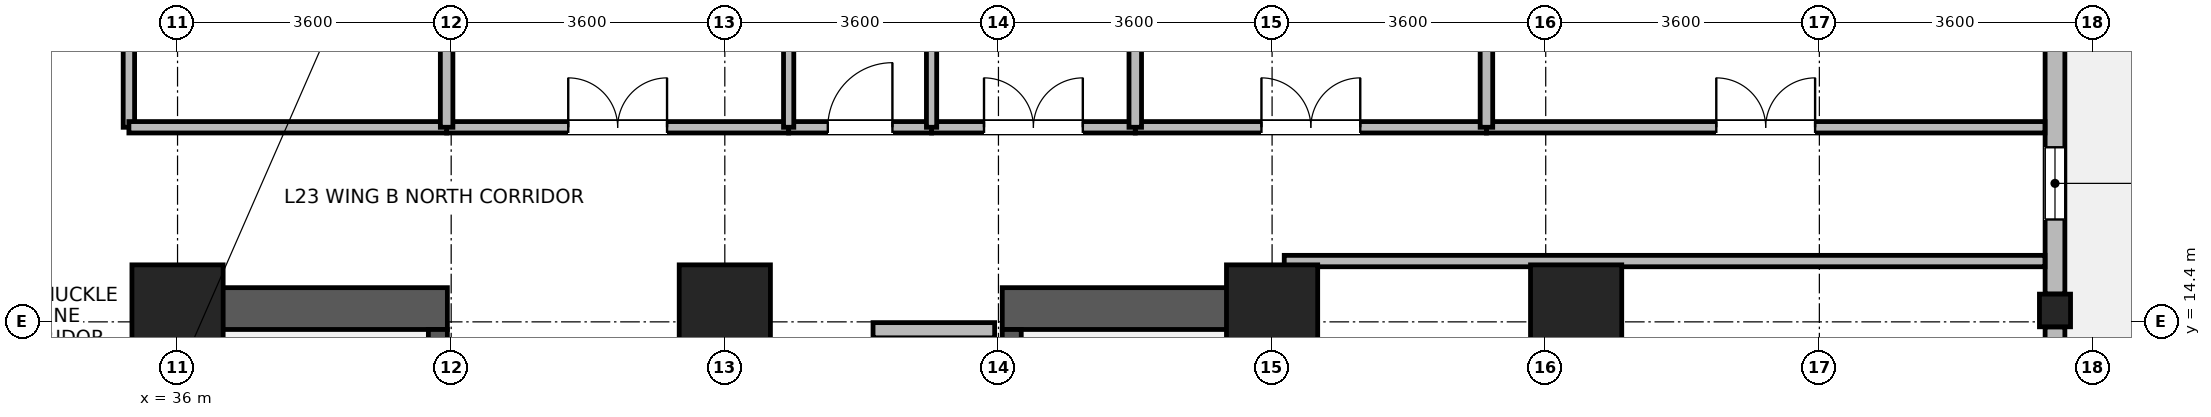
"""IFC4 building model, lengths in metres.
Left out: names, types, materials, properties, quantities, classifications, styles, units other than length and angle.
Written with IfcOpenShell. Run it as: python <this file> out.ifc"""

import sys

from ifc_helpers import new_model, si_unit, direction, frame, frame_2d, origin, origin_2d, place, context, subcontext, project, spatial, rectangle, i_section, extrude, source, transform, mapped, element, fill, save


model = new_model("IFC4")
c1 = context("Model", 3, precision=1e-05, world=origin(), true_north=direction((0.0, 1.0)))
c2 = subcontext(c1, "Body", "Model", "MODEL_VIEW")
j1 = project(units=[si_unit("LENGTHUNIT", "METRE"), si_unit("PLANEANGLEUNIT", "RADIAN")], contexts=[c1])
p1 = place(None, origin())
s1 = spatial("IfcSite", under=j1, at=p1, CompositionType="ELEMENT")
p2 = place(p1, origin())
s2 = spatial("IfcBuilding", under=s1, at=p2, CompositionType="ELEMENT")
p3 = place(p2, frame((0.0, 0.0, 93.4)))
s3 = spatial("IfcBuildingStorey", under=s2, at=p3, CompositionType="ELEMENT", Elevation=93.4)
for number, where, z_axis, x_axis in (
    (1, (36.075, 6.75, 0.0), (0.0, 0.0, 1.0), (0.0, 1.0, 0.0)),
    (2, (50.325, 6.75, 0.0), (0.0, 0.0, 1.0), (0.0, 1.0, 0.0)),
):
    element("IfcWall", number, at=place(p3, frame(where, z_axis=z_axis, x_axis=x_axis)), inside=s3, PredefinedType="SHEAR", context=c2, shape_type="SweptSolid", body=[
        extrude(rectangle(XDim=8.1, YDim=0.55, at=frame_2d((4.05, 0.0))), origin(), (0.0, 0.0, 1.0), 3.45),
    ])
for number, where, z_axis, x_axis in (
    (3, (36.35, 14.575, 0.0), (0.0, 0.0, 1.0), (1.0, 0.0, 0.0)),
    (4, (46.85, 14.575, 0.0), (0.0, 0.0, 1.0), (1.0, 0.0, 0.0)),
):
    element("IfcWall", number, at=place(p3, frame(where, z_axis=z_axis, x_axis=x_axis)), inside=s3, PredefinedType="SHEAR", context=c2, shape_type="SweptSolid", body=[
        extrude(rectangle(XDim=3.2, YDim=0.55, at=frame_2d((1.6, 0.0))), origin(), (0.0, 0.0, 1.0), 3.45),
    ])
p4 = place(p3, frame((39.425, 7.3, 0.0), z_axis=(0.0, 0.0, 1.0), x_axis=(0.0, 1.0, 0.0)))
e5 = element("IfcWall", 5, at=p4, inside=s3, PredefinedType="SHEAR", context=c2, shape_type="SweptSolid", body=[
    extrude(rectangle(XDim=7.0, YDim=0.25, at=frame_2d((3.5, 0.0))), origin(), (0.0, 0.0, 1.0), 3.45),
])
p5 = place(p4, frame((0.15, 0.0, 0.0)))
e6 = element("IfcOpeningElement", 6, at=p5, cuts=e5, PredefinedType="OPENING", context=c2, shape_type="SweptSolid", body=[
    extrude(rectangle(XDim=1.1, YDim=2.08, at=frame_2d((0.55, 1.04))), frame((0.0, 0.135, 0.0), z_axis=(0.0, -1.0, 0.0), x_axis=(1.0, 0.0, 0.0)), (0.0, 0.0, 1.0), 0.27),
])
p6 = place(p3, frame((46.975, 7.3, 0.0), z_axis=(0.0, 0.0, 1.0), x_axis=(0.0, 1.0, 0.0)))
e7 = element("IfcWall", 7, at=p6, inside=s3, PredefinedType="SHEAR", context=c2, shape_type="SweptSolid", body=[
    extrude(rectangle(XDim=7.0, YDim=0.25, at=frame_2d((3.5, 0.0))), origin(), (0.0, 0.0, 1.0), 3.45),
])
p7 = place(p6, frame((0.15, 0.0, 0.0)))
e8 = element("IfcOpeningElement", 8, at=p7, cuts=e7, PredefinedType="OPENING", context=c2, shape_type="SweptSolid", body=[
    extrude(rectangle(XDim=1.1, YDim=2.08, at=frame_2d((0.55, 1.04))), frame((0.0, 0.135, 0.0), z_axis=(0.0, -1.0, 0.0), x_axis=(1.0, 0.0, 0.0)), (0.0, 0.0, 1.0), 0.27),
])
m1 = source(origin(), c2, "Body", "SweptSolid", [
    extrude(rectangle(XDim=1.2, YDim=1.2, at=origin_2d()), origin(), (0.0, 0.0, 1.0), 3.7),
])
for number, where, z_axis, x_axis in (
    (9, (36.0, 14.55, 0.0), (0.0, 0.0, 1.0), (1.0, 0.0, 0.0)),
    (10, (43.2, 14.55, 0.0), (0.0, 0.0, 1.0), (1.0, 0.0, 0.0)),
    (11, (50.4, 14.55, 0.0), (0.0, 0.0, 1.0), (1.0, 0.0, 0.0)),
    (12, (54.4, 14.55, 0.0), (0.0, 0.0, 1.0), (1.0, 0.0, 0.0)),
):
    element("IfcColumn", number, at=place(p3, frame(where, z_axis=z_axis, x_axis=x_axis)), inside=s3, PredefinedType="COLUMN", context=c2, shape_type="MappedRepresentation", body=[
        mapped(m1, transform((0.0, 0.0, 0.0), x_axis=(1.0, 0.0, 0.0), y_axis=(0.0, 1.0, 0.0), z_axis=(0.0, 0.0, 1.0), scale=1.0)),
    ])
m2 = source(origin(), c2, "Body", "SweptSolid", [
    extrude(i_section(OverallWidth=0.409, OverallDepth=0.43, WebThickness=0.024, FlangeThickness=0.033, FilletRadius=0.015, at=origin_2d()), origin(), (0.0, 0.0, 1.0), 3.7),
])
p8 = place(p3, frame((60.7, 14.55, 0.0), z_axis=(0.0, 0.0, 1.0), x_axis=(1.0, 0.0, 0.0)))
e13 = element("IfcColumn", 13, at=p8, inside=s3, PredefinedType="COLUMN", context=c2, shape_type="MappedRepresentation", body=[
    mapped(m2, transform((0.0, 0.0, 0.0), x_axis=(1.0, 0.0, 0.0), y_axis=(0.0, 1.0, 0.0), z_axis=(0.0, 0.0, 1.0), scale=1.0)),
])
p9 = place(p3, frame((60.7, 14.334, 0.0), z_axis=(0.0, 0.0, 1.0), x_axis=(0.0, -1.0, 0.0)))
e14 = element("IfcWall", 14, at=p9, inside=s3, PredefinedType="STANDARD", context=c2, shape_type="SweptSolid", body=[
    extrude(rectangle(XDim=7.068, YDim=0.26, at=frame_2d((3.534, 0.0))), origin(), (0.0, 0.0, 1.0), 2.93),
])
p10 = place(p9, frame((0.867, 0.0, 0.85)))
e15 = element("IfcOpeningElement", 15, at=p10, cuts=e14, PredefinedType="OPENING", context=c2, shape_type="SweptSolid", body=[
    extrude(rectangle(XDim=1.8, YDim=1.85, at=frame_2d((0.9, 0.925))), frame((0.0, 0.14, 0.0), z_axis=(0.0, -1.0, 0.0), x_axis=(1.0, 0.0, 0.0)), (0.0, 0.0, 1.0), 0.28),
])
p11 = place(p9, frame((4.401, 0.0, 0.85)))
e16 = element("IfcOpeningElement", 16, at=p11, cuts=e14, PredefinedType="OPENING", context=c2, shape_type="SweptSolid", body=[
    extrude(rectangle(XDim=1.8, YDim=1.85, at=frame_2d((0.9, 0.925))), frame((0.0, 0.14, 0.0), z_axis=(0.0, -1.0, 0.0), x_axis=(1.0, 0.0, 0.0)), (0.0, 0.0, 1.0), 0.28),
])
p12 = place(p3, frame((60.7, 21.384, 0.0), z_axis=(0.0, 0.0, 1.0), x_axis=(0.0, -1.0, 0.0)))
e17 = element("IfcWall", 17, at=p12, inside=s3, PredefinedType="STANDARD", context=c2, shape_type="SweptSolid", body=[
    extrude(rectangle(XDim=6.618, YDim=0.26, at=frame_2d((3.309, 0.0))), origin(), (0.0, 0.0, 1.0), 2.93),
])
p13 = place(p12, frame((0.754, 0.0, 0.85)))
e18 = element("IfcOpeningElement", 18, at=p13, cuts=e17, PredefinedType="OPENING", context=c2, shape_type="SweptSolid", body=[
    extrude(rectangle(XDim=1.8, YDim=1.85, at=frame_2d((0.9, 0.925))), frame((0.0, 0.14, 0.0), z_axis=(0.0, -1.0, 0.0), x_axis=(1.0, 0.0, 0.0)), (0.0, 0.0, 1.0), 0.28),
])
p14 = place(p12, frame((4.687, 0.0, 0.85)))
e19 = element("IfcOpeningElement", 19, at=p14, cuts=e17, PredefinedType="OPENING", context=c2, shape_type="SweptSolid", body=[
    extrude(rectangle(XDim=0.95, YDim=1.75, at=frame_2d((0.475, 0.875))), frame((0.0, 0.14, 0.0), z_axis=(0.0, -1.0, 0.0), x_axis=(1.0, 0.0, 0.0)), (0.0, 0.0, 1.0), 0.28),
])
p15 = place(p3, frame((45.15, 14.29, 0.0), z_axis=(0.0, 0.0, 1.0), x_axis=(1.0, 0.0, 0.0)))
e20 = element("IfcWall", 20, at=p15, inside=s3, PredefinedType="PARTITIONING", context=c2, shape_type="SweptSolid", body=[
    extrude(rectangle(XDim=1.6, YDim=0.2, at=frame_2d((0.8, 0.0))), origin(), (0.0, 0.0, 1.0), 2.23),
])
p16 = place(p3, frame((50.56, 15.2, 0.0), z_axis=(0.0, 0.0, 1.0), x_axis=(1.0, 0.0, 0.0)))
e21 = element("IfcWall", 21, at=p16, inside=s3, PredefinedType="PARTITIONING", context=c2, shape_type="SweptSolid", body=[
    extrude(rectangle(XDim=10.008, YDim=0.15, at=frame_2d((5.004, 0.0))), origin(), (0.0, 0.0, 1.0), 3.43),
])
p17 = place(p3, frame((35.36, 16.96, 0.0), z_axis=(0.0, 0.0, 1.0), x_axis=(0.0, 1.0, 0.0)))
e22 = element("IfcWall", 22, at=p17, inside=s3, PredefinedType="PARTITIONING", context=c2, shape_type="SweptSolid", body=[
    extrude(rectangle(XDim=9.64, YDim=0.15, at=frame_2d((4.82, 0.0))), origin(), (0.0, 0.0, 1.0), 3.43),
])
p18 = place(p17, frame((2.435, 0.0, 0.0)))
e23 = element("IfcOpeningElement", 23, at=p18, cuts=e22, PredefinedType="OPENING", context=c2, shape_type="SweptSolid", body=[
    extrude(rectangle(XDim=1.3, YDim=2.12, at=frame_2d((0.65, 1.06))), frame((0.0, 0.085, 0.0), z_axis=(0.0, -1.0, 0.0), x_axis=(1.0, 0.0, 0.0)), (0.0, 0.0, 1.0), 0.17),
])
p19 = place(p3, frame((53.22, 16.96, 0.0), z_axis=(0.0, 0.0, 1.0), x_axis=(1.0, 0.0, 0.0)))
e24 = element("IfcWall", 24, at=p19, inside=s3, PredefinedType="PARTITIONING", context=c2, shape_type="SweptSolid", body=[
    extrude(rectangle(XDim=7.348, YDim=0.15, at=frame_2d((3.674, 0.0))), origin(), (0.0, 0.0, 1.0), 3.43),
])
p20 = place(p19, frame((3.024, 0.0, 0.0)))
e25 = element("IfcOpeningElement", 25, at=p20, cuts=e24, PredefinedType="OPENING", context=c2, shape_type="SweptSolid", body=[
    extrude(rectangle(XDim=1.3, YDim=2.12, at=frame_2d((0.65, 1.06))), frame((0.0, 0.085, 0.0), z_axis=(0.0, -1.0, 0.0), x_axis=(1.0, 0.0, 0.0)), (0.0, 0.0, 1.0), 0.17),
])
p21 = place(p3, frame((48.6, 16.96, 0.0), z_axis=(0.0, 0.0, 1.0), x_axis=(1.0, 0.0, 0.0)))
e26 = element("IfcWall", 26, at=p21, inside=s3, PredefinedType="PARTITIONING", context=c2, shape_type="SweptSolid", body=[
    extrude(rectangle(XDim=4.62, YDim=0.15, at=frame_2d((2.31, 0.0))), origin(), (0.0, 0.0, 1.0), 3.43),
])
p22 = place(p21, frame((1.66, 0.0, 0.0)))
e27 = element("IfcOpeningElement", 27, at=p22, cuts=e26, PredefinedType="OPENING", context=c2, shape_type="SweptSolid", body=[
    extrude(rectangle(XDim=1.3, YDim=2.12, at=frame_2d((0.65, 1.06))), frame((0.0, 0.085, 0.0), z_axis=(0.0, -1.0, 0.0), x_axis=(1.0, 0.0, 0.0)), (0.0, 0.0, 1.0), 0.17),
])
p23 = place(p3, frame((39.54, 16.96, 0.0), z_axis=(0.0, 0.0, 1.0), x_axis=(1.0, 0.0, 0.0)))
e28 = element("IfcWall", 28, at=p23, inside=s3, PredefinedType="PARTITIONING", context=c2, shape_type="SweptSolid", body=[
    extrude(rectangle(XDim=4.5, YDim=0.15, at=frame_2d((2.25, 0.0))), origin(), (0.0, 0.0, 1.0), 3.43),
])
p24 = place(p23, frame((1.6, 0.0, 0.0)))
e29 = element("IfcOpeningElement", 29, at=p24, cuts=e28, PredefinedType="OPENING", context=c2, shape_type="SweptSolid", body=[
    extrude(rectangle(XDim=1.3, YDim=2.12, at=frame_2d((0.65, 1.06))), frame((0.0, 0.085, 0.0), z_axis=(0.0, -1.0, 0.0), x_axis=(1.0, 0.0, 0.0)), (0.0, 0.0, 1.0), 0.17),
])
p25 = place(p3, frame((35.36, 16.96, 0.0), z_axis=(0.0, 0.0, 1.0), x_axis=(1.0, 0.0, 0.0)))
e30 = element("IfcWall", 30, at=p25, inside=s3, PredefinedType="PARTITIONING", context=c2, shape_type="SweptSolid", body=[
    extrude(rectangle(XDim=4.18, YDim=0.15, at=frame_2d((2.09, 0.0))), origin(), (0.0, 0.0, 1.0), 3.43),
])
p26 = place(p3, frame((45.92, 16.96, 0.0), z_axis=(0.0, 0.0, 1.0), x_axis=(1.0, 0.0, 0.0)))
e31 = element("IfcWall", 31, at=p26, inside=s3, PredefinedType="PARTITIONING", context=c2, shape_type="SweptSolid", body=[
    extrude(rectangle(XDim=2.68, YDim=0.15, at=frame_2d((1.34, 0.0))), origin(), (0.0, 0.0, 1.0), 3.43),
])
p27 = place(p26, frame((0.69, 0.0, 0.0)))
e32 = element("IfcOpeningElement", 32, at=p27, cuts=e31, PredefinedType="OPENING", context=c2, shape_type="SweptSolid", body=[
    extrude(rectangle(XDim=1.3, YDim=2.12, at=frame_2d((0.65, 1.06))), frame((0.0, 0.085, 0.0), z_axis=(0.0, -1.0, 0.0), x_axis=(1.0, 0.0, 0.0)), (0.0, 0.0, 1.0), 0.17),
])
p28 = place(p3, frame((44.04, 16.96, 0.0), z_axis=(0.0, 0.0, 1.0), x_axis=(1.0, 0.0, 0.0)))
e33 = element("IfcWall", 33, at=p28, inside=s3, PredefinedType="PARTITIONING", context=c2, shape_type="SweptSolid", body=[
    extrude(rectangle(XDim=1.88, YDim=0.15, at=frame_2d((0.94, 0.0))), origin(), (0.0, 0.0, 1.0), 3.43),
])
p29 = place(p28, frame((0.515, 0.0, 0.0)))
e34 = element("IfcOpeningElement", 34, at=p29, cuts=e33, PredefinedType="OPENING", context=c2, shape_type="SweptSolid", body=[
    extrude(rectangle(XDim=0.85, YDim=2.04, at=frame_2d((0.425, 1.02))), frame((0.0, 0.085, 0.0), z_axis=(0.0, -1.0, 0.0), x_axis=(1.0, 0.0, 0.0)), (0.0, 0.0, 1.0), 0.17),
])
p30 = place(p3, frame((39.54, 16.96, 0.0), z_axis=(0.0, 0.0, 1.0), x_axis=(0.0, 1.0, 0.0)))
e35 = element("IfcWall", 35, at=p30, inside=s3, PredefinedType="PARTITIONING", context=c2, shape_type="SweptSolid", body=[
    extrude(rectangle(XDim=9.64, YDim=0.165, at=frame_2d((4.82, 0.0))), origin(), (0.0, 0.0, 1.0), 3.43),
])
for number, where, z_axis, x_axis in (
    (36, (44.04, 16.96, 0.0), (0.0, 0.0, 1.0), (0.0, 1.0, 0.0)),
    (37, (45.92, 16.96, 0.0), (0.0, 0.0, 1.0), (0.0, 1.0, 0.0)),
):
    element("IfcWall", number, at=place(p3, frame(where, z_axis=z_axis, x_axis=x_axis)), inside=s3, PredefinedType="PARTITIONING", context=c2, shape_type="SweptSolid", body=[
        extrude(rectangle(XDim=9.64, YDim=0.135, at=frame_2d((4.82, 0.0))), origin(), (0.0, 0.0, 1.0), 3.43),
    ])
for number, where, z_axis, x_axis in (
    (38, (48.6, 16.96, 0.0), (0.0, 0.0, 1.0), (0.0, 1.0, 0.0)),
    (39, (53.22, 16.96, 0.0), (0.0, 0.0, 1.0), (0.0, 1.0, 0.0)),
):
    element("IfcWall", number, at=place(p3, frame(where, z_axis=z_axis, x_axis=x_axis)), inside=s3, PredefinedType="PARTITIONING", context=c2, shape_type="SweptSolid", body=[
        extrude(rectangle(XDim=9.64, YDim=0.165, at=frame_2d((4.82, 0.0))), origin(), (0.0, 0.0, 1.0), 3.43),
    ])
p31 = place(p14, origin())
e40 = element("IfcWindow", 40, at=p31, inside=s3, PartitioningType="SINGLE_PANEL", PredefinedType="WINDOW", context=c2, shape_type="SweptSolid", body=[
    extrude(rectangle(XDim=0.95, YDim=1.75, at=frame_2d((0.475, 0.875))), frame((0.0, 0.03, 0.0), z_axis=(0.0, -1.0, 0.0), x_axis=(1.0, 0.0, 0.0)), (0.0, 0.0, 1.0), 0.06),
])
fill(e19, e40)
p32 = place(p20, origin())
e41 = element("IfcDoor", 41, at=p32, inside=s3, OperationType="DOUBLE_DOOR_SINGLE_SWING", PredefinedType="DOOR", context=c2, shape_type="SweptSolid", body=[
    extrude(rectangle(XDim=1.3, YDim=2.12, at=frame_2d((0.65, 1.06))), frame((0.0, 0.025, 0.0), z_axis=(0.0, -1.0, 0.0), x_axis=(1.0, 0.0, 0.0)), (0.0, 0.0, 1.0), 0.05),
])
fill(e25, e41)
p33 = place(p22, origin())
e42 = element("IfcDoor", 42, at=p33, inside=s3, OperationType="DOUBLE_DOOR_SINGLE_SWING", PredefinedType="DOOR", context=c2, shape_type="SweptSolid", body=[
    extrude(rectangle(XDim=1.3, YDim=2.12, at=frame_2d((0.65, 1.06))), frame((0.0, 0.025, 0.0), z_axis=(0.0, -1.0, 0.0), x_axis=(1.0, 0.0, 0.0)), (0.0, 0.0, 1.0), 0.05),
])
fill(e27, e42)
p34 = place(p24, origin())
e43 = element("IfcDoor", 43, at=p34, inside=s3, OperationType="DOUBLE_DOOR_SINGLE_SWING", PredefinedType="DOOR", context=c2, shape_type="SweptSolid", body=[
    extrude(rectangle(XDim=1.3, YDim=2.12, at=frame_2d((0.65, 1.06))), frame((0.0, 0.025, 0.0), z_axis=(0.0, -1.0, 0.0), x_axis=(1.0, 0.0, 0.0)), (0.0, 0.0, 1.0), 0.05),
])
fill(e29, e43)
p35 = place(p27, origin())
e44 = element("IfcDoor", 44, at=p35, inside=s3, OperationType="DOUBLE_DOOR_SINGLE_SWING", PredefinedType="DOOR", context=c2, shape_type="SweptSolid", body=[
    extrude(rectangle(XDim=1.3, YDim=2.12, at=frame_2d((0.65, 1.06))), frame((0.0, 0.025, 0.0), z_axis=(0.0, -1.0, 0.0), x_axis=(1.0, 0.0, 0.0)), (0.0, 0.0, 1.0), 0.05),
])
fill(e32, e44)
p36 = place(p29, origin())
e45 = element("IfcDoor", 45, at=p36, inside=s3, OperationType="SINGLE_SWING_RIGHT", PredefinedType="DOOR", context=c2, shape_type="SweptSolid", body=[
    extrude(rectangle(XDim=0.85, YDim=2.04, at=frame_2d((0.425, 1.02))), frame((0.0, 0.025, 0.0), z_axis=(0.0, -1.0, 0.0), x_axis=(1.0, 0.0, 0.0)), (0.0, 0.0, 1.0), 0.05),
])
fill(e34, e45)
save(model, sys.argv[1])
